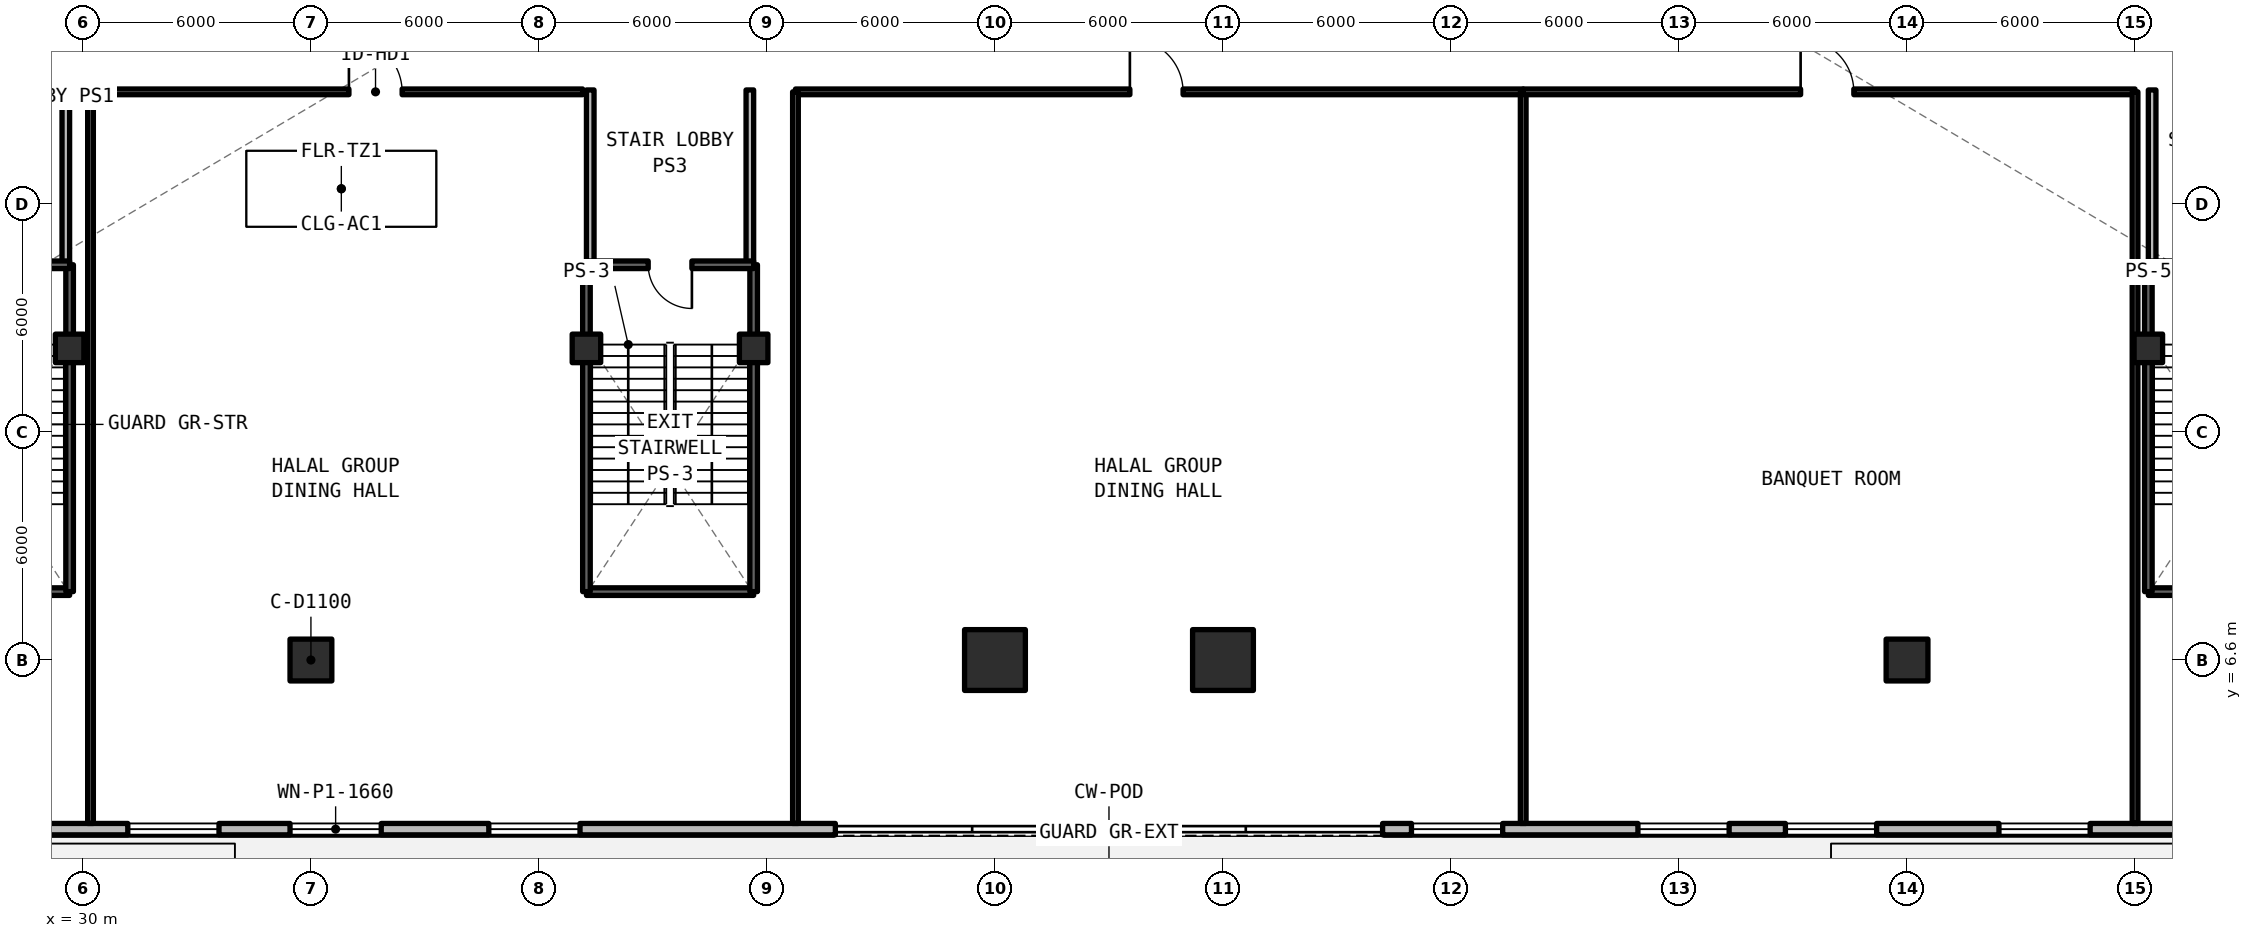
"""IFC4 building model, lengths in metres.
Left out: names, types, materials, properties, quantities, classifications, styles, units other than length and angle.
Written with IfcOpenShell. Run it as: python <this file> out.ifc"""

import sys

from ifc_helpers import new_model, si_unit, direction, frame, frame_2d, origin, origin_2d, place, context, subcontext, project, spatial, rectangle, circle, extrude, element, fill, save


model = new_model("IFC4")
c1 = context("Model", 3, precision=1e-05, world=origin(), true_north=direction((0.0, 1.0)))
c2 = subcontext(c1, "Body", "Model", "MODEL_VIEW")
j1 = project(units=[si_unit("LENGTHUNIT", "METRE"), si_unit("PLANEANGLEUNIT", "RADIAN")], contexts=[c1])
p1 = place(None, origin())
s1 = spatial("IfcSite", under=j1, at=p1, CompositionType="ELEMENT")
p2 = place(p1, origin())
s2 = spatial("IfcBuilding", under=s1, at=p2, CompositionType="ELEMENT")
p3 = place(p2, frame((0.0, 0.0, 9.9)))
s3 = spatial("IfcBuildingStorey", under=s2, at=p3, CompositionType="ELEMENT", Elevation=9.9)
p4 = place(p3, frame((36.0, 6.6, 0.0), z_axis=(0.0, 0.0, 1.0), x_axis=(1.0, 0.0, 0.0)))
e1 = element("IfcColumn", 1, at=p4, inside=s3, PredefinedType="COLUMN", context=c2, shape_type="SweptSolid", body=[
    extrude(circle(Radius=0.55, at=origin_2d()), origin(), (0.0, 0.0, 1.0), 4.95),
])
for number, where, z_axis, x_axis in (
    (2, (54.0, 6.6, 0.0), (0.0, 0.0, 1.0), (1.0, 0.0, 0.0)),
    (3, (60.0, 6.6, 0.0), (0.0, 0.0, 1.0), (1.0, 0.0, 0.0)),
):
    element("IfcColumn", number, at=place(p3, frame(where, z_axis=z_axis, x_axis=x_axis)), inside=s3, PredefinedType="COLUMN", context=c2, shape_type="SweptSolid", body=[
        extrude(rectangle(XDim=1.6, YDim=1.6, at=origin_2d()), origin(), (0.0, 0.0, 1.0), 4.95),
    ])
p5 = place(p3, frame((78.0, 6.6, 0.0), z_axis=(0.0, 0.0, 1.0), x_axis=(1.0, 0.0, 0.0)))
e4 = element("IfcColumn", 4, at=p5, inside=s3, PredefinedType="COLUMN", context=c2, shape_type="SweptSolid", body=[
    extrude(circle(Radius=0.55, at=origin_2d()), origin(), (0.0, 0.0, 1.0), 4.95),
])
for number, where, z_axis, x_axis in (
    (5, (29.65, 14.8, 0.0), (0.0, 0.0, 1.0), (1.0, 0.0, 0.0)),
    (6, (43.25, 14.8, 0.0), (0.0, 0.0, 1.0), (1.0, 0.0, 0.0)),
    (7, (47.65, 14.8, 0.0), (0.0, 0.0, 1.0), (1.0, 0.0, 0.0)),
    (8, (84.35, 14.8, 0.0), (0.0, 0.0, 1.0), (1.0, 0.0, 0.0)),
):
    element("IfcColumn", number, at=place(p3, frame(where, z_axis=z_axis, x_axis=x_axis)), inside=s3, PredefinedType="COLUMN", context=c2, shape_type="SweptSolid", body=[
        extrude(rectangle(XDim=0.75, YDim=0.75, at=origin_2d()), origin(), (0.0, 0.0, 1.0), 4.95),
    ])
p6 = place(p3, frame((5.462, 2.15, 0.0), z_axis=(0.0, 0.0, 1.0), x_axis=(1.0, 0.0, 0.0)))
e9 = element("IfcWall", 9, at=p6, inside=s3, PredefinedType="SOLIDWALL", context=c2, shape_type="SweptSolid", body=[
    extrude(rectangle(XDim=44.338, YDim=0.3, at=frame_2d((22.169, 0.0))), origin(), (0.0, 0.0, 1.0), 4.67),
])
p7 = place(p6, frame((7.75, 0.0, 0.0)))
e10 = element("IfcOpeningElement", 10, at=p7, cuts=e9, PredefinedType="OPENING", context=c2, shape_type="SweptSolid", body=[
    extrude(rectangle(XDim=1.5, YDim=2.2, at=frame_2d((0.75, 1.1))), frame((0.0, 0.16, 0.0), z_axis=(0.0, -1.0, 0.0), x_axis=(1.0, 0.0, 0.0)), (0.0, 0.0, 1.0), 0.32),
])
p8 = place(p6, frame((29.988, 0.0, 0.78)))
e11 = element("IfcOpeningElement", 11, at=p8, cuts=e9, PredefinedType="OPENING", context=c2, shape_type="SweptSolid", body=[
    extrude(rectangle(XDim=2.4, YDim=1.66, at=frame_2d((1.2, 0.83))), frame((0.0, 0.16, 0.0), z_axis=(0.0, -1.0, 0.0), x_axis=(1.0, 0.0, 0.0)), (0.0, 0.0, 1.0), 0.32),
])
p9 = place(p6, frame((20.738, 0.0, 0.78)))
e12 = element("IfcOpeningElement", 12, at=p9, cuts=e9, PredefinedType="OPENING", context=c2, shape_type="SweptSolid", body=[
    extrude(rectangle(XDim=2.4, YDim=1.66, at=frame_2d((1.2, 0.83))), frame((0.0, 0.16, 0.0), z_axis=(0.0, -1.0, 0.0), x_axis=(1.0, 0.0, 0.0)), (0.0, 0.0, 1.0), 0.32),
])
p10 = place(p6, frame((25.719, 0.0, 0.78)))
e13 = element("IfcOpeningElement", 13, at=p10, cuts=e9, PredefinedType="OPENING", context=c2, shape_type="SweptSolid", body=[
    extrude(rectangle(XDim=2.4, YDim=1.66, at=frame_2d((1.2, 0.83))), frame((0.0, 0.16, 0.0), z_axis=(0.0, -1.0, 0.0), x_axis=(1.0, 0.0, 0.0)), (0.0, 0.0, 1.0), 0.32),
])
p11 = place(p6, frame((35.219, 0.0, 0.78)))
e14 = element("IfcOpeningElement", 14, at=p11, cuts=e9, PredefinedType="OPENING", context=c2, shape_type="SweptSolid", body=[
    extrude(rectangle(XDim=2.4, YDim=1.66, at=frame_2d((1.2, 0.83))), frame((0.0, 0.16, 0.0), z_axis=(0.0, -1.0, 0.0), x_axis=(1.0, 0.0, 0.0)), (0.0, 0.0, 1.0), 0.32),
])
p12 = place(p3, frame((64.2, 2.15, 0.0), z_axis=(0.0, 0.0, 1.0), x_axis=(1.0, 0.0, 0.0)))
e15 = element("IfcWall", 15, at=p12, inside=s3, PredefinedType="SOLIDWALL", context=c2, shape_type="SweptSolid", body=[
    extrude(rectangle(XDim=44.338, YDim=0.3, at=frame_2d((22.169, 0.0))), origin(), (0.0, 0.0, 1.0), 4.67),
])
p13 = place(p12, frame((0.76, 0.0, 0.78)))
e16 = element("IfcOpeningElement", 16, at=p13, cuts=e15, PredefinedType="OPENING", context=c2, shape_type="SweptSolid", body=[
    extrude(rectangle(XDim=2.4, YDim=1.66, at=frame_2d((1.2, 0.83))), frame((0.0, 0.16, 0.0), z_axis=(0.0, -1.0, 0.0), x_axis=(1.0, 0.0, 0.0)), (0.0, 0.0, 1.0), 0.32),
])
p14 = place(p12, frame((10.6, 0.0, 0.78)))
e17 = element("IfcOpeningElement", 17, at=p14, cuts=e15, PredefinedType="OPENING", context=c2, shape_type="SweptSolid", body=[
    extrude(rectangle(XDim=2.4, YDim=1.66, at=frame_2d((1.2, 0.83))), frame((0.0, 0.16, 0.0), z_axis=(0.0, -1.0, 0.0), x_axis=(1.0, 0.0, 0.0)), (0.0, 0.0, 1.0), 0.32),
])
p15 = place(p12, frame((30.869, 0.0, 0.78)))
e18 = element("IfcOpeningElement", 18, at=p15, cuts=e15, PredefinedType="OPENING", context=c2, shape_type="SweptSolid", body=[
    extrude(rectangle(XDim=2.4, YDim=1.66, at=frame_2d((1.2, 0.83))), frame((0.0, 0.16, 0.0), z_axis=(0.0, -1.0, 0.0), x_axis=(1.0, 0.0, 0.0)), (0.0, 0.0, 1.0), 0.32),
])
p16 = place(p12, frame((6.719, 0.0, 0.78)))
e19 = element("IfcOpeningElement", 19, at=p16, cuts=e15, PredefinedType="OPENING", context=c2, shape_type="SweptSolid", body=[
    extrude(rectangle(XDim=2.4, YDim=1.66, at=frame_2d((1.2, 0.83))), frame((0.0, 0.16, 0.0), z_axis=(0.0, -1.0, 0.0), x_axis=(1.0, 0.0, 0.0)), (0.0, 0.0, 1.0), 0.32),
])
p17 = place(p12, frame((16.219, 0.0, 0.78)))
e20 = element("IfcOpeningElement", 20, at=p17, cuts=e15, PredefinedType="OPENING", context=c2, shape_type="SweptSolid", body=[
    extrude(rectangle(XDim=2.4, YDim=1.66, at=frame_2d((1.2, 0.83))), frame((0.0, 0.16, 0.0), z_axis=(0.0, -1.0, 0.0), x_axis=(1.0, 0.0, 0.0)), (0.0, 0.0, 1.0), 0.32),
])
p18 = place(p12, frame((25.719, 0.0, 0.78)))
e21 = element("IfcOpeningElement", 21, at=p18, cuts=e15, PredefinedType="OPENING", context=c2, shape_type="SweptSolid", body=[
    extrude(rectangle(XDim=2.4, YDim=1.66, at=frame_2d((1.2, 0.83))), frame((0.0, 0.16, 0.0), z_axis=(0.0, -1.0, 0.0), x_axis=(1.0, 0.0, 0.0)), (0.0, 0.0, 1.0), 0.32),
])
p19 = place(p12, frame((35.219, 0.0, 0.78)))
e22 = element("IfcOpeningElement", 22, at=p19, cuts=e15, PredefinedType="OPENING", context=c2, shape_type="SweptSolid", body=[
    extrude(rectangle(XDim=2.4, YDim=1.66, at=frame_2d((1.2, 0.83))), frame((0.0, 0.16, 0.0), z_axis=(0.0, -1.0, 0.0), x_axis=(1.0, 0.0, 0.0)), (0.0, 0.0, 1.0), 0.32),
])
for number, where, z_axis, x_axis in (
    (23, (29.55, 17.0, 0.0), (0.0, 0.0, 1.0), (0.0, 1.0, 0.0)),
    (24, (43.35, 17.0, 0.0), (0.0, 0.0, 1.0), (0.0, 1.0, 0.0)),
    (25, (47.55, 17.0, 0.0), (0.0, 0.0, 1.0), (0.0, 1.0, 0.0)),
    (26, (84.45, 17.0, 0.0), (0.0, 0.0, 1.0), (0.0, 1.0, 0.0)),
):
    element("IfcWall", number, at=place(p3, frame(where, z_axis=z_axis, x_axis=x_axis)), inside=s3, PredefinedType="SOLIDWALL", context=c2, shape_type="SweptSolid", body=[
        extrude(rectangle(XDim=4.6, YDim=0.2, at=frame_2d((2.3, 0.0))), origin(), (0.0, 0.0, 1.0), 3.89),
    ])
p20 = place(p3, frame((30.2, 21.55, 0.0), z_axis=(0.0, 0.0, 1.0), x_axis=(1.0, 0.0, 0.0)))
e27 = element("IfcWall", 27, at=p20, inside=s3, PredefinedType="SOLIDWALL", context=c2, shape_type="SweptSolid", body=[
    extrude(rectangle(XDim=12.95, YDim=0.15, at=frame_2d((6.475, 0.0))), origin(), (0.0, 0.0, 1.0), 3.89),
])
p21 = place(p20, frame((6.8, 0.0, 0.0)))
e28 = element("IfcOpeningElement", 28, at=p21, cuts=e27, PredefinedType="OPENING", context=c2, shape_type="SweptSolid", body=[
    extrude(rectangle(XDim=1.4, YDim=2.15, at=frame_2d((0.7, 1.075))), frame((0.0, 0.085, 0.0), z_axis=(0.0, -1.0, 0.0), x_axis=(1.0, 0.0, 0.0)), (0.0, 0.0, 1.0), 0.17),
])
p22 = place(p3, frame((30.2, 2.3, 0.0), z_axis=(0.0, 0.0, 1.0), x_axis=(0.0, 1.0, 0.0)))
e29 = element("IfcWall", 29, at=p22, inside=s3, PredefinedType="SOLIDWALL", context=c2, shape_type="SweptSolid", body=[
    extrude(rectangle(XDim=19.25, YDim=0.15, at=frame_2d((9.625, 0.0))), origin(), (0.0, 0.0, 1.0), 3.89),
])
p23 = place(p3, frame((48.75, 21.55, 0.0), z_axis=(0.0, 0.0, 1.0), x_axis=(1.0, 0.0, 0.0)))
e30 = element("IfcWall", 30, at=p23, inside=s3, PredefinedType="SOLIDWALL", context=c2, shape_type="SweptSolid", body=[
    extrude(rectangle(XDim=19.15, YDim=0.15, at=frame_2d((9.575, 0.0))), origin(), (0.0, 0.0, 1.0), 3.89),
])
p24 = place(p23, frame((8.8, 0.0, 0.0)))
e31 = element("IfcOpeningElement", 31, at=p24, cuts=e30, PredefinedType="OPENING", context=c2, shape_type="SweptSolid", body=[
    extrude(rectangle(XDim=1.4, YDim=2.15, at=frame_2d((0.7, 1.075))), frame((0.0, 0.085, 0.0), z_axis=(0.0, -1.0, 0.0), x_axis=(1.0, 0.0, 0.0)), (0.0, 0.0, 1.0), 0.17),
])
for number, where, z_axis, x_axis in (
    (32, (48.75, 2.3, 0.0), (0.0, 0.0, 1.0), (0.0, 1.0, 0.0)),
    (33, (67.9, 2.3, 0.0), (0.0, 0.0, 1.0), (0.0, 1.0, 0.0)),
):
    element("IfcWall", number, at=place(p3, frame(where, z_axis=z_axis, x_axis=x_axis)), inside=s3, PredefinedType="SOLIDWALL", context=c2, shape_type="SweptSolid", body=[
        extrude(rectangle(XDim=19.25, YDim=0.15, at=frame_2d((9.625, 0.0))), origin(), (0.0, 0.0, 1.0), 3.89),
    ])
p25 = place(p3, frame((67.9, 21.55, 0.0), z_axis=(0.0, 0.0, 1.0), x_axis=(1.0, 0.0, 0.0)))
e34 = element("IfcWall", 34, at=p25, inside=s3, PredefinedType="SOLIDWALL", context=c2, shape_type="SweptSolid", body=[
    extrude(rectangle(XDim=16.1, YDim=0.15, at=frame_2d((8.05, 0.0))), origin(), (0.0, 0.0, 1.0), 3.89),
])
p26 = place(p25, frame((7.3, 0.0, 0.0)))
e35 = element("IfcOpeningElement", 35, at=p26, cuts=e34, PredefinedType="OPENING", context=c2, shape_type="SweptSolid", body=[
    extrude(rectangle(XDim=1.4, YDim=2.15, at=frame_2d((0.7, 1.075))), frame((0.0, 0.085, 0.0), z_axis=(0.0, -1.0, 0.0), x_axis=(1.0, 0.0, 0.0)), (0.0, 0.0, 1.0), 0.17),
])
p27 = place(p3, frame((84.0, 2.3, 0.0), z_axis=(0.0, 0.0, 1.0), x_axis=(0.0, 1.0, 0.0)))
e36 = element("IfcWall", 36, at=p27, inside=s3, PredefinedType="SOLIDWALL", context=c2, shape_type="SweptSolid", body=[
    extrude(rectangle(XDim=19.25, YDim=0.15, at=frame_2d((9.625, 0.0))), origin(), (0.0, 0.0, 1.0), 3.89),
])
p28 = place(p3, frame((25.25, 8.4, 0.0), z_axis=(0.0, 0.0, 1.0), x_axis=(1.0, 0.0, 0.0)))
e37 = element("IfcWall", 37, at=p28, inside=s3, PredefinedType="SOLIDWALL", context=c2, shape_type="SweptSolid", body=[
    extrude(rectangle(XDim=4.4, YDim=0.2, at=frame_2d((2.2, 0.0))), origin(), (0.0, 0.0, 1.0), 4.95),
])
p29 = place(p3, frame((29.65, 8.4, 0.0), z_axis=(0.0, 0.0, 1.0), x_axis=(0.0, 1.0, 0.0)))
e38 = element("IfcWall", 38, at=p29, inside=s3, PredefinedType="SOLIDWALL", context=c2, shape_type="SweptSolid", body=[
    extrude(rectangle(XDim=8.6, YDim=0.2, at=frame_2d((4.3, 0.0))), origin(), (0.0, 0.0, 1.0), 4.95),
])
p30 = place(p3, frame((29.65, 17.0, 0.0), z_axis=(0.0, 0.0, 1.0), x_axis=(-1.0, 0.0, 0.0)))
e39 = element("IfcWall", 39, at=p30, inside=s3, PredefinedType="SOLIDWALL", context=c2, shape_type="SweptSolid", body=[
    extrude(rectangle(XDim=4.4, YDim=0.2, at=frame_2d((2.2, 0.0))), origin(), (0.0, 0.0, 1.0), 4.95),
])
p31 = place(p30, frame((1.625, 0.0, 0.0)))
e40 = element("IfcOpeningElement", 40, at=p31, cuts=e39, PredefinedType="OPENING", context=c2, shape_type="SweptSolid", body=[
    extrude(rectangle(XDim=1.15, YDim=2.15, at=frame_2d((0.575, 1.075))), frame((0.0, 0.11, 0.0), z_axis=(0.0, -1.0, 0.0), x_axis=(1.0, 0.0, 0.0)), (0.0, 0.0, 1.0), 0.22),
])
p32 = place(p3, frame((43.25, 8.4, 0.0), z_axis=(0.0, 0.0, 1.0), x_axis=(1.0, 0.0, 0.0)))
e41 = element("IfcWall", 41, at=p32, inside=s3, PredefinedType="SOLIDWALL", context=c2, shape_type="SweptSolid", body=[
    extrude(rectangle(XDim=4.4, YDim=0.2, at=frame_2d((2.2, 0.0))), origin(), (0.0, 0.0, 1.0), 4.95),
])
p33 = place(p3, frame((47.65, 8.4, 0.0), z_axis=(0.0, 0.0, 1.0), x_axis=(0.0, 1.0, 0.0)))
e42 = element("IfcWall", 42, at=p33, inside=s3, PredefinedType="SOLIDWALL", context=c2, shape_type="SweptSolid", body=[
    extrude(rectangle(XDim=8.6, YDim=0.2, at=frame_2d((4.3, 0.0))), origin(), (0.0, 0.0, 1.0), 4.95),
])
p34 = place(p3, frame((47.65, 17.0, 0.0), z_axis=(0.0, 0.0, 1.0), x_axis=(-1.0, 0.0, 0.0)))
e43 = element("IfcWall", 43, at=p34, inside=s3, PredefinedType="SOLIDWALL", context=c2, shape_type="SweptSolid", body=[
    extrude(rectangle(XDim=4.4, YDim=0.2, at=frame_2d((2.2, 0.0))), origin(), (0.0, 0.0, 1.0), 4.95),
])
p35 = place(p34, frame((1.625, 0.0, 0.0)))
e44 = element("IfcOpeningElement", 44, at=p35, cuts=e43, PredefinedType="OPENING", context=c2, shape_type="SweptSolid", body=[
    extrude(rectangle(XDim=1.15, YDim=2.15, at=frame_2d((0.575, 1.075))), frame((0.0, 0.11, 0.0), z_axis=(0.0, -1.0, 0.0), x_axis=(1.0, 0.0, 0.0)), (0.0, 0.0, 1.0), 0.22),
])
p36 = place(p3, frame((43.25, 17.0, 0.0), z_axis=(0.0, 0.0, 1.0), x_axis=(0.0, -1.0, 0.0)))
e45 = element("IfcWall", 45, at=p36, inside=s3, PredefinedType="SOLIDWALL", context=c2, shape_type="SweptSolid", body=[
    extrude(rectangle(XDim=8.6, YDim=0.2, at=frame_2d((4.3, 0.0))), origin(), (0.0, 0.0, 1.0), 4.95),
])
p37 = place(p3, frame((84.35, 8.4, 0.0), z_axis=(0.0, 0.0, 1.0), x_axis=(1.0, 0.0, 0.0)))
e46 = element("IfcWall", 46, at=p37, inside=s3, PredefinedType="SOLIDWALL", context=c2, shape_type="SweptSolid", body=[
    extrude(rectangle(XDim=4.4, YDim=0.2, at=frame_2d((2.2, 0.0))), origin(), (0.0, 0.0, 1.0), 4.95),
])
p38 = place(p3, frame((88.75, 17.0, 0.0), z_axis=(0.0, 0.0, 1.0), x_axis=(-1.0, 0.0, 0.0)))
e47 = element("IfcWall", 47, at=p38, inside=s3, PredefinedType="SOLIDWALL", context=c2, shape_type="SweptSolid", body=[
    extrude(rectangle(XDim=4.4, YDim=0.2, at=frame_2d((2.2, 0.0))), origin(), (0.0, 0.0, 1.0), 4.95),
])
p39 = place(p38, frame((1.625, 0.0, 0.0)))
e48 = element("IfcOpeningElement", 48, at=p39, cuts=e47, PredefinedType="OPENING", context=c2, shape_type="SweptSolid", body=[
    extrude(rectangle(XDim=1.15, YDim=2.15, at=frame_2d((0.575, 1.075))), frame((0.0, 0.11, 0.0), z_axis=(0.0, -1.0, 0.0), x_axis=(1.0, 0.0, 0.0)), (0.0, 0.0, 1.0), 0.22),
])
p40 = place(p3, frame((84.35, 17.0, 0.0), z_axis=(0.0, 0.0, 1.0), x_axis=(0.0, -1.0, 0.0)))
e49 = element("IfcWall", 49, at=p40, inside=s3, PredefinedType="SOLIDWALL", context=c2, shape_type="SweptSolid", body=[
    extrude(rectangle(XDim=8.6, YDim=0.2, at=frame_2d((4.3, 0.0))), origin(), (0.0, 0.0, 1.0), 4.95),
])
p41 = place(p8, origin())
e50 = element("IfcWindow", 50, at=p41, inside=s3, PartitioningType="SINGLE_PANEL", PredefinedType="WINDOW", context=c2, shape_type="SweptSolid", body=[
    extrude(rectangle(XDim=2.4, YDim=1.66, at=frame_2d((1.2, 0.83))), frame((0.0, 0.03, 0.0), z_axis=(0.0, -1.0, 0.0), x_axis=(1.0, 0.0, 0.0)), (0.0, 0.0, 1.0), 0.06),
])
fill(e11, e50)
p42 = place(p10, origin())
e51 = element("IfcWindow", 51, at=p42, inside=s3, PartitioningType="SINGLE_PANEL", PredefinedType="WINDOW", context=c2, shape_type="SweptSolid", body=[
    extrude(rectangle(XDim=2.4, YDim=1.66, at=frame_2d((1.2, 0.83))), frame((0.0, 0.03, 0.0), z_axis=(0.0, -1.0, 0.0), x_axis=(1.0, 0.0, 0.0)), (0.0, 0.0, 1.0), 0.06),
])
fill(e13, e51)
p43 = place(p11, origin())
e52 = element("IfcWindow", 52, at=p43, inside=s3, PartitioningType="SINGLE_PANEL", PredefinedType="WINDOW", context=c2, shape_type="SweptSolid", body=[
    extrude(rectangle(XDim=2.4, YDim=1.66, at=frame_2d((1.2, 0.83))), frame((0.0, 0.03, 0.0), z_axis=(0.0, -1.0, 0.0), x_axis=(1.0, 0.0, 0.0)), (0.0, 0.0, 1.0), 0.06),
])
fill(e14, e52)
p44 = place(p13, origin())
e53 = element("IfcWindow", 53, at=p44, inside=s3, PartitioningType="SINGLE_PANEL", PredefinedType="WINDOW", context=c2, shape_type="SweptSolid", body=[
    extrude(rectangle(XDim=2.4, YDim=1.66, at=frame_2d((1.2, 0.83))), frame((0.0, 0.03, 0.0), z_axis=(0.0, -1.0, 0.0), x_axis=(1.0, 0.0, 0.0)), (0.0, 0.0, 1.0), 0.06),
])
fill(e16, e53)
p45 = place(p14, origin())
e54 = element("IfcWindow", 54, at=p45, inside=s3, PartitioningType="SINGLE_PANEL", PredefinedType="WINDOW", context=c2, shape_type="SweptSolid", body=[
    extrude(rectangle(XDim=2.4, YDim=1.66, at=frame_2d((1.2, 0.83))), frame((0.0, 0.03, 0.0), z_axis=(0.0, -1.0, 0.0), x_axis=(1.0, 0.0, 0.0)), (0.0, 0.0, 1.0), 0.06),
])
fill(e17, e54)
p46 = place(p16, origin())
e55 = element("IfcWindow", 55, at=p46, inside=s3, PartitioningType="SINGLE_PANEL", PredefinedType="WINDOW", context=c2, shape_type="SweptSolid", body=[
    extrude(rectangle(XDim=2.4, YDim=1.66, at=frame_2d((1.2, 0.83))), frame((0.0, 0.03, 0.0), z_axis=(0.0, -1.0, 0.0), x_axis=(1.0, 0.0, 0.0)), (0.0, 0.0, 1.0), 0.06),
])
fill(e19, e55)
p47 = place(p17, origin())
e56 = element("IfcWindow", 56, at=p47, inside=s3, PartitioningType="SINGLE_PANEL", PredefinedType="WINDOW", context=c2, shape_type="SweptSolid", body=[
    extrude(rectangle(XDim=2.4, YDim=1.66, at=frame_2d((1.2, 0.83))), frame((0.0, 0.03, 0.0), z_axis=(0.0, -1.0, 0.0), x_axis=(1.0, 0.0, 0.0)), (0.0, 0.0, 1.0), 0.06),
])
fill(e20, e56)
p48 = place(p21, origin())
e57 = element("IfcDoor", 57, at=p48, inside=s3, OperationType="SINGLE_SWING_LEFT", PredefinedType="DOOR", context=c2, shape_type="SweptSolid", body=[
    extrude(rectangle(XDim=1.4, YDim=2.15, at=frame_2d((0.7, 1.075))), frame((0.0, 0.025, 0.0), z_axis=(0.0, -1.0, 0.0), x_axis=(1.0, 0.0, 0.0)), (0.0, 0.0, 1.0), 0.05),
])
fill(e28, e57)
p49 = place(p24, origin())
e58 = element("IfcDoor", 58, at=p49, inside=s3, OperationType="SINGLE_SWING_RIGHT", PredefinedType="DOOR", context=c2, shape_type="SweptSolid", body=[
    extrude(rectangle(XDim=1.4, YDim=2.15, at=frame_2d((0.7, 1.075))), frame((0.0, 0.025, 0.0), z_axis=(0.0, -1.0, 0.0), x_axis=(1.0, 0.0, 0.0)), (0.0, 0.0, 1.0), 0.05),
])
fill(e31, e58)
p50 = place(p26, origin())
e59 = element("IfcDoor", 59, at=p50, inside=s3, OperationType="SINGLE_SWING_LEFT", PredefinedType="DOOR", context=c2, shape_type="SweptSolid", body=[
    extrude(rectangle(XDim=1.4, YDim=2.15, at=frame_2d((0.7, 1.075))), frame((0.0, 0.025, 0.0), z_axis=(0.0, -1.0, 0.0), x_axis=(1.0, 0.0, 0.0)), (0.0, 0.0, 1.0), 0.05),
])
fill(e35, e59)
p51 = place(p35, origin())
e60 = element("IfcDoor", 60, at=p51, inside=s3, OperationType="SINGLE_SWING_RIGHT", PredefinedType="DOOR", context=c2, shape_type="SweptSolid", body=[
    extrude(rectangle(XDim=1.15, YDim=2.15, at=frame_2d((0.575, 1.075))), frame((0.0, 0.025, 0.0), z_axis=(0.0, -1.0, 0.0), x_axis=(1.0, 0.0, 0.0)), (0.0, 0.0, 1.0), 0.05),
])
fill(e44, e60)
save(model, sys.argv[1])
